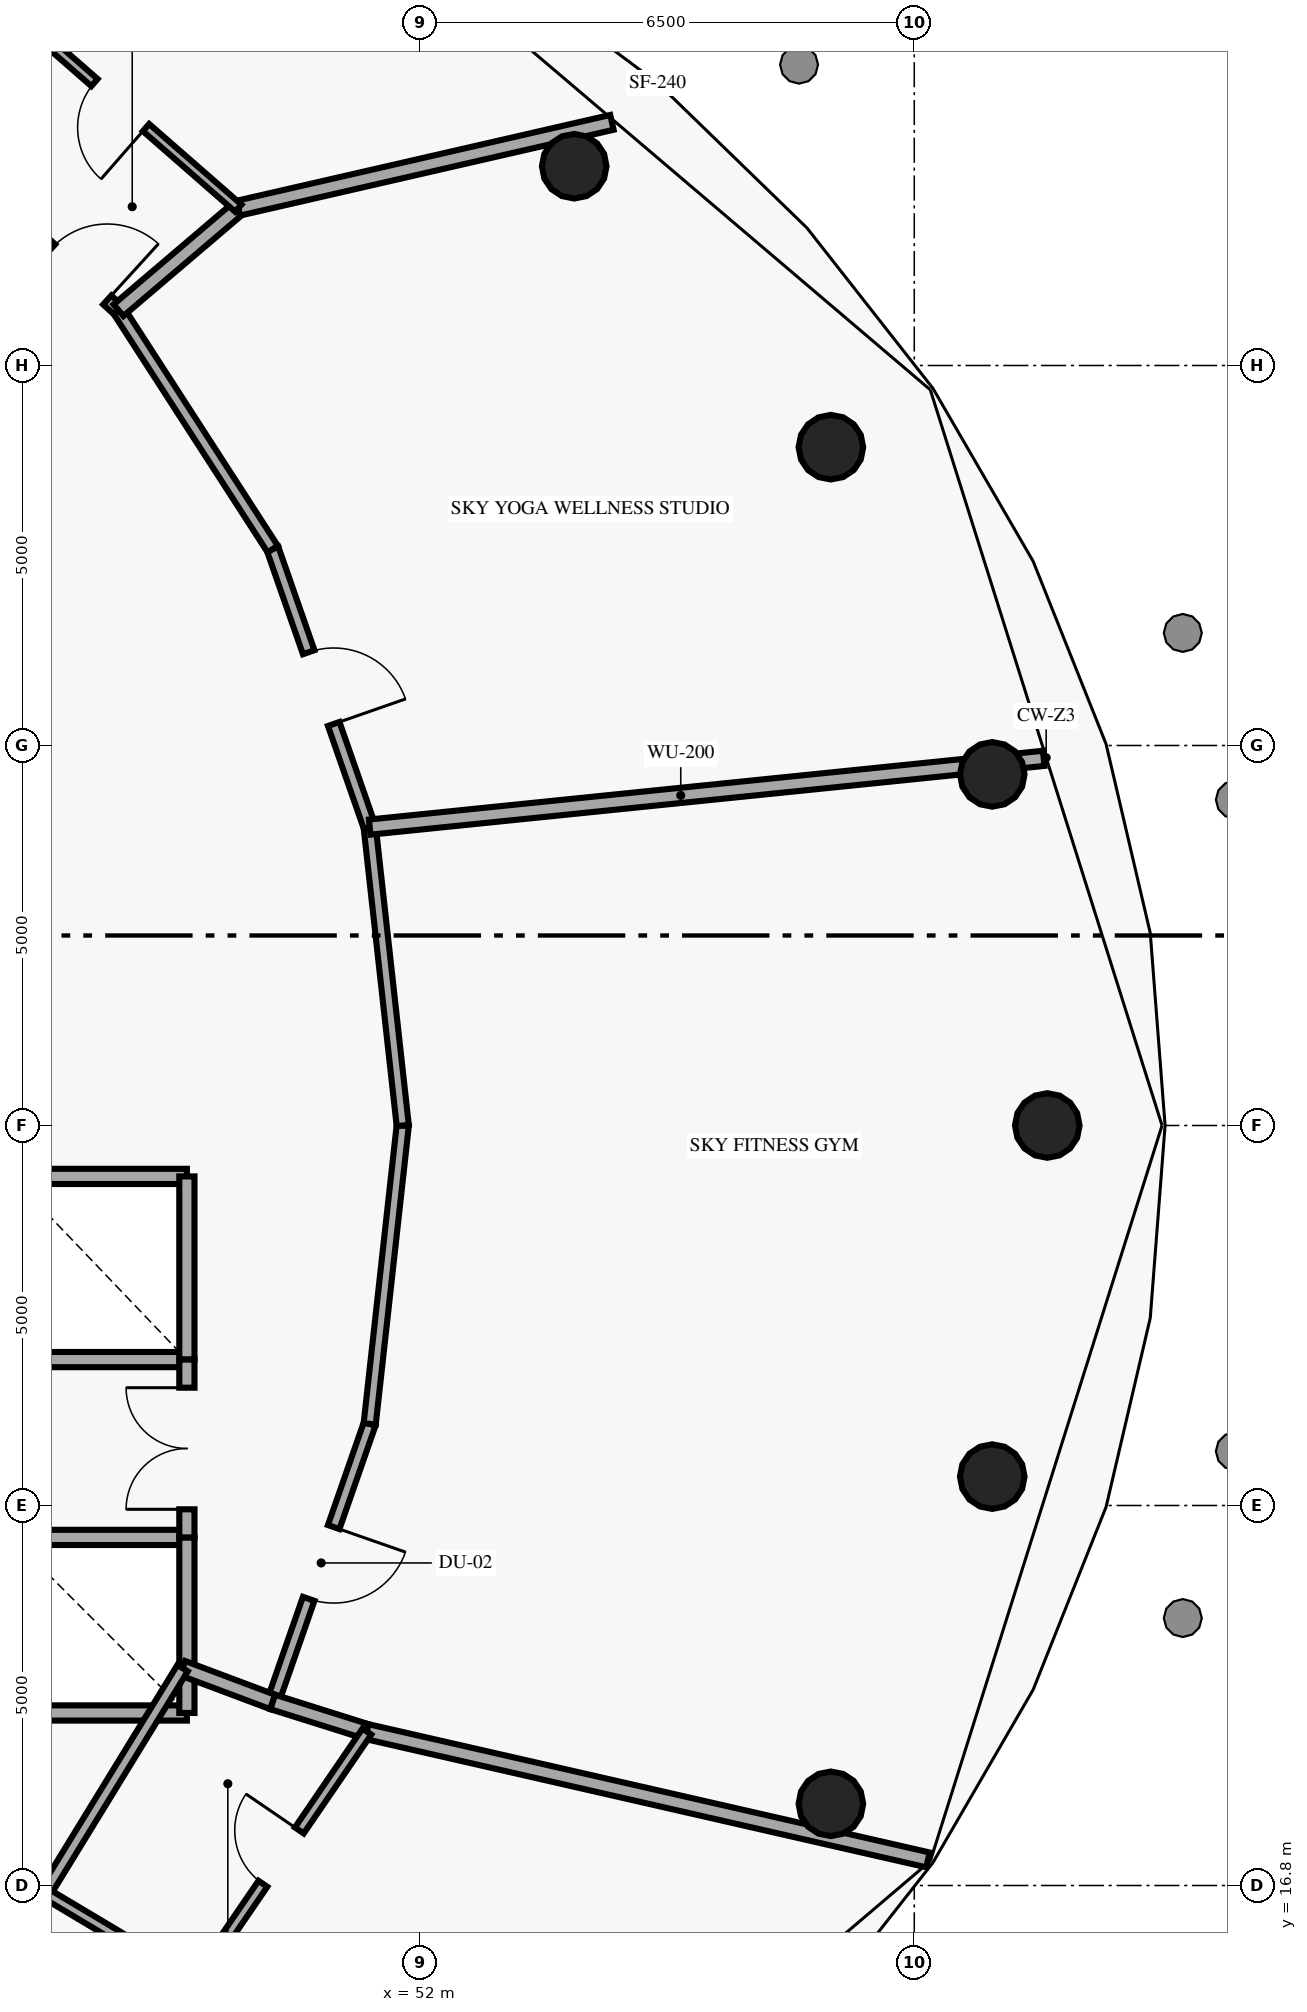
"""IFC4 building model, lengths in metres.
Left out: names, types, materials, properties, quantities, classifications, styles, units other than length and angle.
Written with IfcOpenShell. Run it as: python <this file> out.ifc"""

import sys

from ifc_helpers import new_model, si_unit, direction, frame, frame_2d, origin, origin_2d, place, context, subcontext, project, spatial, rectangle, circle, extrude, element, fill, save


model = new_model("IFC4")
c1 = context("Model", 3, precision=1e-05, world=origin(), true_north=direction((0.0, 1.0)))
c2 = subcontext(c1, "Body", "Model", "MODEL_VIEW")
j1 = project(units=[si_unit("LENGTHUNIT", "METRE"), si_unit("PLANEANGLEUNIT", "RADIAN")], contexts=[c1])
p1 = place(None, origin())
s1 = spatial("IfcSite", under=j1, at=p1, CompositionType="ELEMENT")
p2 = place(p1, origin())
s2 = spatial("IfcBuilding", under=s1, at=p2, CompositionType="ELEMENT")
p3 = place(p2, frame((0.0, 0.0, 208.15)))
s3 = spatial("IfcBuildingStorey", under=s2, at=p3, CompositionType="ELEMENT", Elevation=208.15)
for number, where, z_axis, x_axis in (
    (1, (60.25, 26.8, 0.0), (0.0, 0.0, 1.0), (1.0, 0.0, 0.0)),
    (2, (59.526, 31.42, 0.0), (0.0, 0.0, 1.0), (1.0, 0.0, 0.0)),
    (3, (57.403, 35.725, 0.0), (0.0, 0.0, 1.0), (1.0, 0.0, 0.0)),
    (4, (54.026, 39.422, 0.0), (0.0, 0.0, 1.0), (1.0, 0.0, 0.0)),
    (5, (57.403, 17.875, 0.0), (0.0, 0.0, 1.0), (1.0, 0.0, 0.0)),
    (6, (59.526, 22.18, 0.0), (0.0, 0.0, 1.0), (1.0, 0.0, 0.0)),
):
    element("IfcColumn", number, at=place(p3, frame(where, z_axis=z_axis, x_axis=x_axis)), inside=s3, PredefinedType="COLUMN", context=c2, shape_type="SweptSolid", body=[
        extrude(circle(Radius=0.425, at=origin_2d()), origin(), (0.0, 0.0, 1.0), 3.41),
    ])
for number, where, z_axis, x_axis in (
    (7, (46.62, 23.72, 0.0), (0.0, 0.0, 1.0), (1.0, 0.0, 0.0)),
    (8, (46.62, 26.13, 0.0), (0.0, 0.0, 1.0), (1.0, 0.0, 0.0)),
):
    element("IfcWall", number, at=place(p3, frame(where, z_axis=z_axis, x_axis=x_axis)), inside=s3, PredefinedType="SOLIDWALL", context=c2, shape_type="SweptSolid", body=[
        extrude(rectangle(XDim=2.31, YDim=0.2, at=frame_2d((1.155, 0.0))), origin(), (0.0, 0.0, 1.0), 3.41),
    ])
p4 = place(p3, frame((48.93, 23.72, 0.0), z_axis=(0.0, 0.0, 1.0), x_axis=(0.0, 1.0, 0.0)))
e9 = element("IfcWall", 9, at=p4, inside=s3, PredefinedType="SOLIDWALL", context=c2, shape_type="SweptSolid", body=[
    extrude(rectangle(XDim=2.41, YDim=0.2, at=frame_2d((1.205, 0.0))), origin(), (0.0, 0.0, 1.0), 3.41),
])
for number, where, z_axis, x_axis in (
    (10, (46.62, 19.07, 0.0), (0.0, 0.0, 1.0), (1.0, 0.0, 0.0)),
    (11, (46.62, 21.38, 0.0), (0.0, 0.0, 1.0), (1.0, 0.0, 0.0)),
    (12, (48.93, 19.07, 0.0), (0.0, 0.0, 1.0), (0.0, 1.0, 0.0)),
):
    element("IfcWall", number, at=place(p3, frame(where, z_axis=z_axis, x_axis=x_axis)), inside=s3, PredefinedType="SOLIDWALL", context=c2, shape_type="SweptSolid", body=[
        extrude(rectangle(XDim=2.31, YDim=0.2, at=frame_2d((1.155, 0.0))), origin(), (0.0, 0.0, 1.0), 3.41),
    ])
p5 = place(p3, frame((48.93, 21.38, 0.0), z_axis=(0.0, 0.0, 1.0), x_axis=(0.0, 1.0, 0.0)))
e13 = element("IfcWall", 13, at=p5, inside=s3, PredefinedType="SOLIDWALL", context=c2, shape_type="SweptSolid", body=[
    extrude(rectangle(XDim=2.34, YDim=0.2, at=frame_2d((1.17, 0.0))), origin(), (0.0, 0.0, 1.0), 3.41),
])
p6 = place(p5, frame((0.37, 0.0, 0.0)))
e14 = element("IfcOpeningElement", 14, at=p6, cuts=e13, PredefinedType="OPENING", context=c2, shape_type="SweptSolid", body=[
    extrude(rectangle(XDim=1.6, YDim=2.2, at=frame_2d((0.8, 1.1))), frame((0.0, 0.11, 0.0), z_axis=(0.0, -1.0, 0.0), x_axis=(1.0, 0.0, 0.0)), (0.0, 0.0, 1.0), 0.22),
])
p7 = place(p3, frame((51.335, 22.874, 0.0), z_axis=(0.0, 0.0, 1.0), x_axis=(-0.32925850992, -0.944239817867, 0.0)))
e15 = element("IfcWall", 15, at=p7, inside=s3, PredefinedType="PARTITIONING", context=c2, shape_type="SweptSolid", body=[
    extrude(rectangle(XDim=3.875, YDim=0.16, at=frame_2d((1.938, 0.0))), origin(), (0.0, 0.0, 1.0), 3.41),
])
p8 = place(p7, frame((1.438, 0.0, 0.0)))
e16 = element("IfcOpeningElement", 16, at=p8, cuts=e15, PredefinedType="OPENING", context=c2, shape_type="SweptSolid", body=[
    extrude(rectangle(XDim=1.0, YDim=2.15, at=frame_2d((0.5, 1.075))), frame((0.0, 0.09, 0.0), z_axis=(0.0, -1.0, 0.0), x_axis=(1.0, 0.0, 0.0)), (0.0, 0.0, 1.0), 0.18),
])
for number, where, z_axis, x_axis in (
    (17, (51.335, 22.874, 0.0), (0.0, 0.0, 1.0), (0.11, 0.994, 0.0)),
    (18, (51.77, 26.8, 0.0), (0.0, 0.0, 1.0), (-0.11, 0.994, 0.0)),
):
    element("IfcWall", number, at=place(p3, frame(where, z_axis=z_axis, x_axis=x_axis)), inside=s3, PredefinedType="PARTITIONING", context=c2, shape_type="SweptSolid", body=[
        extrude(rectangle(XDim=3.95, YDim=0.16, at=frame_2d((1.975, 0.0))), origin(), (0.0, 0.0, 1.0), 3.41),
    ])
p9 = place(p3, frame((50.059, 34.385, 0.0), z_axis=(0.0, 0.0, 1.0), x_axis=(0.32925850992, -0.944239817867, 0.0)))
e19 = element("IfcWall", 19, at=p9, inside=s3, PredefinedType="PARTITIONING", context=c2, shape_type="SweptSolid", body=[
    extrude(rectangle(XDim=3.875, YDim=0.16, at=frame_2d((1.938, 0.0))), origin(), (0.0, 0.0, 1.0), 3.41),
])
p10 = place(p9, frame((1.438, 0.0, 0.0)))
e20 = element("IfcOpeningElement", 20, at=p10, cuts=e19, PredefinedType="OPENING", context=c2, shape_type="SweptSolid", body=[
    extrude(rectangle(XDim=1.0, YDim=2.15, at=frame_2d((0.5, 1.075))), frame((0.0, 0.09, 0.0), z_axis=(0.0, -1.0, 0.0), x_axis=(1.0, 0.0, 0.0)), (0.0, 0.0, 1.0), 0.18),
])
p11 = place(p3, frame((50.059, 34.385, 0.0), z_axis=(0.0, 0.0, 1.0), x_axis=(-0.542485127432, 0.840065406094, 0.0)))
e21 = element("IfcWall", 21, at=p11, inside=s3, PredefinedType="PARTITIONING", context=c2, shape_type="SweptSolid", body=[
    extrude(rectangle(XDim=3.74, YDim=0.16, at=frame_2d((1.87, 0.0))), origin(), (0.0, 0.0, 1.0), 3.41),
])
p12 = place(p3, frame((45.385, 39.938, 0.0), z_axis=(0.0, 0.0, 1.0), x_axis=(0.739059723008, -0.673639908132, 0.0)))
e22 = element("IfcWall", 22, at=p12, inside=s3, PredefinedType="PARTITIONING", context=c2, shape_type="SweptSolid", body=[
    extrude(rectangle(XDim=3.579, YDim=0.16, at=frame_2d((1.79, 0.0))), origin(), (0.0, 0.0, 1.0), 3.41),
])
p13 = place(p12, frame((2.379, 0.0, 0.0)))
e23 = element("IfcOpeningElement", 23, at=p13, cuts=e22, PredefinedType="OPENING", context=c2, shape_type="SweptSolid", body=[
    extrude(rectangle(XDim=1.0, YDim=2.15, at=frame_2d((0.5, 1.075))), frame((0.0, 0.09, 0.0), z_axis=(0.0, -1.0, 0.0), x_axis=(1.0, 0.0, 0.0)), (0.0, 0.0, 1.0), 0.18),
])
p14 = place(p3, frame((48.873, 19.66, 0.0), z_axis=(0.0, 0.0, 1.0), x_axis=(0.93631333527, -0.351165684821, 0.0)))
e24 = element("IfcWall", 24, at=p14, inside=s3, PredefinedType="PARTITIONING", context=c2, shape_type="SweptSolid", body=[
    extrude(rectangle(XDim=1.267, YDim=0.2, at=frame_2d((0.633, 0.0))), origin(), (0.0, 0.0, 1.0), 3.41),
])
p15 = place(p3, frame((50.059, 19.215, 0.0), z_axis=(0.0, 0.0, 1.0), x_axis=(0.953832301714, -0.300339708008, 0.0)))
e25 = element("IfcWall", 25, at=p15, inside=s3, PredefinedType="PARTITIONING", context=c2, shape_type="SweptSolid", body=[
    extrude(rectangle(XDim=1.299, YDim=0.2, at=frame_2d((0.649, 0.0))), origin(), (0.0, 0.0, 1.0), 3.41),
])
p16 = place(p3, frame((51.298, 18.825, 0.0), z_axis=(0.0, 0.0, 1.0), x_axis=(0.97483809237, -0.222914094809, 0.0)))
e26 = element("IfcWall", 26, at=p16, inside=s3, PredefinedType="PARTITIONING", context=c2, shape_type="SweptSolid", body=[
    extrude(rectangle(XDim=7.572, YDim=0.2, at=frame_2d((3.786, 0.0))), origin(), (0.0, 0.0, 1.0), 3.41),
])
p17 = place(p3, frame((51.335, 30.726, 0.0), z_axis=(0.0, 0.0, 1.0), x_axis=(0.994837199953, 0.101483720809, 0.0)))
e27 = element("IfcWall", 27, at=p17, inside=s3, PredefinedType="PARTITIONING", context=c2, shape_type="SweptSolid", body=[
    extrude(rectangle(XDim=8.228, YDim=0.2, at=frame_2d((4.114, 0.0))), origin(), (0.0, 0.0, 1.0), 3.41),
])
p18 = place(p3, frame((59.52, 31.561, 0.0), z_axis=(0.0, 0.0, 1.0), x_axis=(0.994776809631, 0.102073987974, 0.0)))
e28 = element("IfcWall", 28, at=p18, inside=s3, PredefinedType="PARTITIONING", context=c2, shape_type="SweptSolid", body=[
    extrude(rectangle(XDim=0.687, YDim=0.2, at=frame_2d((0.343, 0.0))), origin(), (0.0, 0.0, 1.0), 2.795),
])
p19 = place(p3, frame((48.03, 37.527, 0.0), z_axis=(0.0, 0.0, 1.0), x_axis=(0.761307875953, 0.64839055978, 0.0)))
e29 = element("IfcWall", 29, at=p19, inside=s3, PredefinedType="PARTITIONING", context=c2, shape_type="SweptSolid", body=[
    extrude(rectangle(XDim=2.071, YDim=0.2, at=frame_2d((1.036, 0.0))), origin(), (0.0, 0.0, 1.0), 3.41),
])
p20 = place(p3, frame((49.607, 38.87, 0.0), z_axis=(0.0, 0.0, 1.0), x_axis=(0.974622401259, 0.223855254492, 0.0)))
e30 = element("IfcWall", 30, at=p20, inside=s3, PredefinedType="PARTITIONING", context=c2, shape_type="SweptSolid", body=[
    extrude(rectangle(XDim=5.043, YDim=0.2, at=frame_2d((2.521, 0.0))), origin(), (0.0, 0.0, 1.0), 3.41),
])
p21 = place(p3, frame((46.5, 41.583, 0.0), z_axis=(0.0, 0.0, 1.0), x_axis=(0.753258291351, -0.657724825828, 0.0)))
e31 = element("IfcWall", 31, at=p21, inside=s3, PredefinedType="PARTITIONING", context=c2, shape_type="SweptSolid", body=[
    extrude(rectangle(XDim=4.125, YDim=0.125, at=frame_2d((2.062, 0.0))), origin(), (0.0, 0.0, 1.0), 3.41),
])
p22 = place(p21, frame((1.612, 0.0, 0.0)))
e32 = element("IfcOpeningElement", 32, at=p22, cuts=e31, PredefinedType="OPENING", context=c2, shape_type="SweptSolid", body=[
    extrude(rectangle(XDim=0.9, YDim=2.1, at=frame_2d((0.45, 1.05))), frame((0.0, 0.073, 0.0), z_axis=(0.0, -1.0, 0.0), x_axis=(1.0, 0.0, 0.0)), (0.0, 0.0, 1.0), 0.145),
])
p23 = place(p3, frame((47.061, 16.703, 0.0), z_axis=(0.0, 0.0, 1.0), x_axis=(0.522486120877, 0.852647789823, 0.0)))
e33 = element("IfcWall", 33, at=p23, inside=s3, PredefinedType="PARTITIONING", context=c2, shape_type="SweptSolid", body=[
    extrude(rectangle(XDim=3.468, YDim=0.16, at=frame_2d((1.734, 0.0))), origin(), (0.0, 0.0, 1.0), 3.41),
])
p24 = place(p3, frame((51.298, 18.825, 0.0), z_axis=(0.0, 0.0, 1.0), x_axis=(-0.56419813198, -0.825639429697, 0.0)))
e34 = element("IfcWall", 34, at=p24, inside=s3, PredefinedType="PARTITIONING", context=c2, shape_type="SweptSolid", body=[
    extrude(rectangle(XDim=4.0, YDim=0.14, at=frame_2d((2.0, 0.0))), origin(), (0.0, 0.0, 1.0), 3.41),
])
p25 = place(p24, frame((1.575, 0.0, 0.0)))
e35 = element("IfcOpeningElement", 35, at=p25, cuts=e34, PredefinedType="OPENING", context=c2, shape_type="SweptSolid", body=[
    extrude(rectangle(XDim=0.85, YDim=2.1, at=frame_2d((0.425, 1.05))), frame((0.0, 0.08, 0.0), z_axis=(0.0, -1.0, 0.0), x_axis=(1.0, 0.0, 0.0)), (0.0, 0.0, 1.0), 0.16),
])
p26 = place(p3, frame((47.061, 16.703, 0.0), z_axis=(0.0, 0.0, 1.0), x_axis=(0.858844842863, -0.512235820583, 0.0)))
e36 = element("IfcWall", 36, at=p26, inside=s3, PredefinedType="PARTITIONING", context=c2, shape_type="SweptSolid", body=[
    extrude(rectangle(XDim=2.305, YDim=0.14, at=frame_2d((1.153, 0.0))), origin(), (0.0, 0.0, 1.0), 3.41),
])
p27 = place(p6, origin())
e37 = element("IfcDoor", 37, at=p27, inside=s3, OperationType="DOUBLE_DOOR_SINGLE_SWING", PredefinedType="DOOR", context=c2, shape_type="SweptSolid", body=[
    extrude(rectangle(XDim=1.6, YDim=2.2, at=frame_2d((0.8, 1.1))), frame((0.0, 0.025, 0.0), z_axis=(0.0, -1.0, 0.0), x_axis=(1.0, 0.0, 0.0)), (0.0, 0.0, 1.0), 0.05),
])
fill(e14, e37)
p28 = place(p8, origin())
e38 = element("IfcDoor", 38, at=p28, inside=s3, OperationType="SINGLE_SWING_LEFT", PredefinedType="DOOR", context=c2, shape_type="SweptSolid", body=[
    extrude(rectangle(XDim=1.0, YDim=2.15, at=frame_2d((0.5, 1.075))), frame((0.0, 0.025, 0.0), z_axis=(0.0, -1.0, 0.0), x_axis=(1.0, 0.0, 0.0)), (0.0, 0.0, 1.0), 0.05),
])
fill(e16, e38)
p29 = place(p10, origin())
e39 = element("IfcDoor", 39, at=p29, inside=s3, OperationType="SINGLE_SWING_RIGHT", PredefinedType="DOOR", context=c2, shape_type="SweptSolid", body=[
    extrude(rectangle(XDim=1.0, YDim=2.15, at=frame_2d((0.5, 1.075))), frame((0.0, 0.025, 0.0), z_axis=(0.0, -1.0, 0.0), x_axis=(1.0, 0.0, 0.0)), (0.0, 0.0, 1.0), 0.05),
])
fill(e20, e39)
p30 = place(p13, origin())
e40 = element("IfcDoor", 40, at=p30, inside=s3, OperationType="SINGLE_SWING_RIGHT", PredefinedType="DOOR", context=c2, shape_type="SweptSolid", body=[
    extrude(rectangle(XDim=1.0, YDim=2.15, at=frame_2d((0.5, 1.075))), frame((0.0, 0.025, 0.0), z_axis=(0.0, -1.0, 0.0), x_axis=(1.0, 0.0, 0.0)), (0.0, 0.0, 1.0), 0.05),
])
fill(e23, e40)
p31 = place(p22, origin())
e41 = element("IfcDoor", 41, at=p31, inside=s3, OperationType="SINGLE_SWING_RIGHT", PredefinedType="DOOR", context=c2, shape_type="SweptSolid", body=[
    extrude(rectangle(XDim=0.9, YDim=2.1, at=frame_2d((0.45, 1.05))), frame((0.0, 0.025, 0.0), z_axis=(0.0, -1.0, 0.0), x_axis=(1.0, 0.0, 0.0)), (0.0, 0.0, 1.0), 0.05),
])
fill(e32, e41)
p32 = place(p25, origin())
e42 = element("IfcDoor", 42, at=p32, inside=s3, OperationType="SINGLE_SWING_LEFT", PredefinedType="DOOR", context=c2, shape_type="SweptSolid", body=[
    extrude(rectangle(XDim=0.85, YDim=2.1, at=frame_2d((0.425, 1.05))), frame((0.0, 0.025, 0.0), z_axis=(0.0, -1.0, 0.0), x_axis=(1.0, 0.0, 0.0)), (0.0, 0.0, 1.0), 0.05),
])
fill(e35, e42)
save(model, sys.argv[1])
